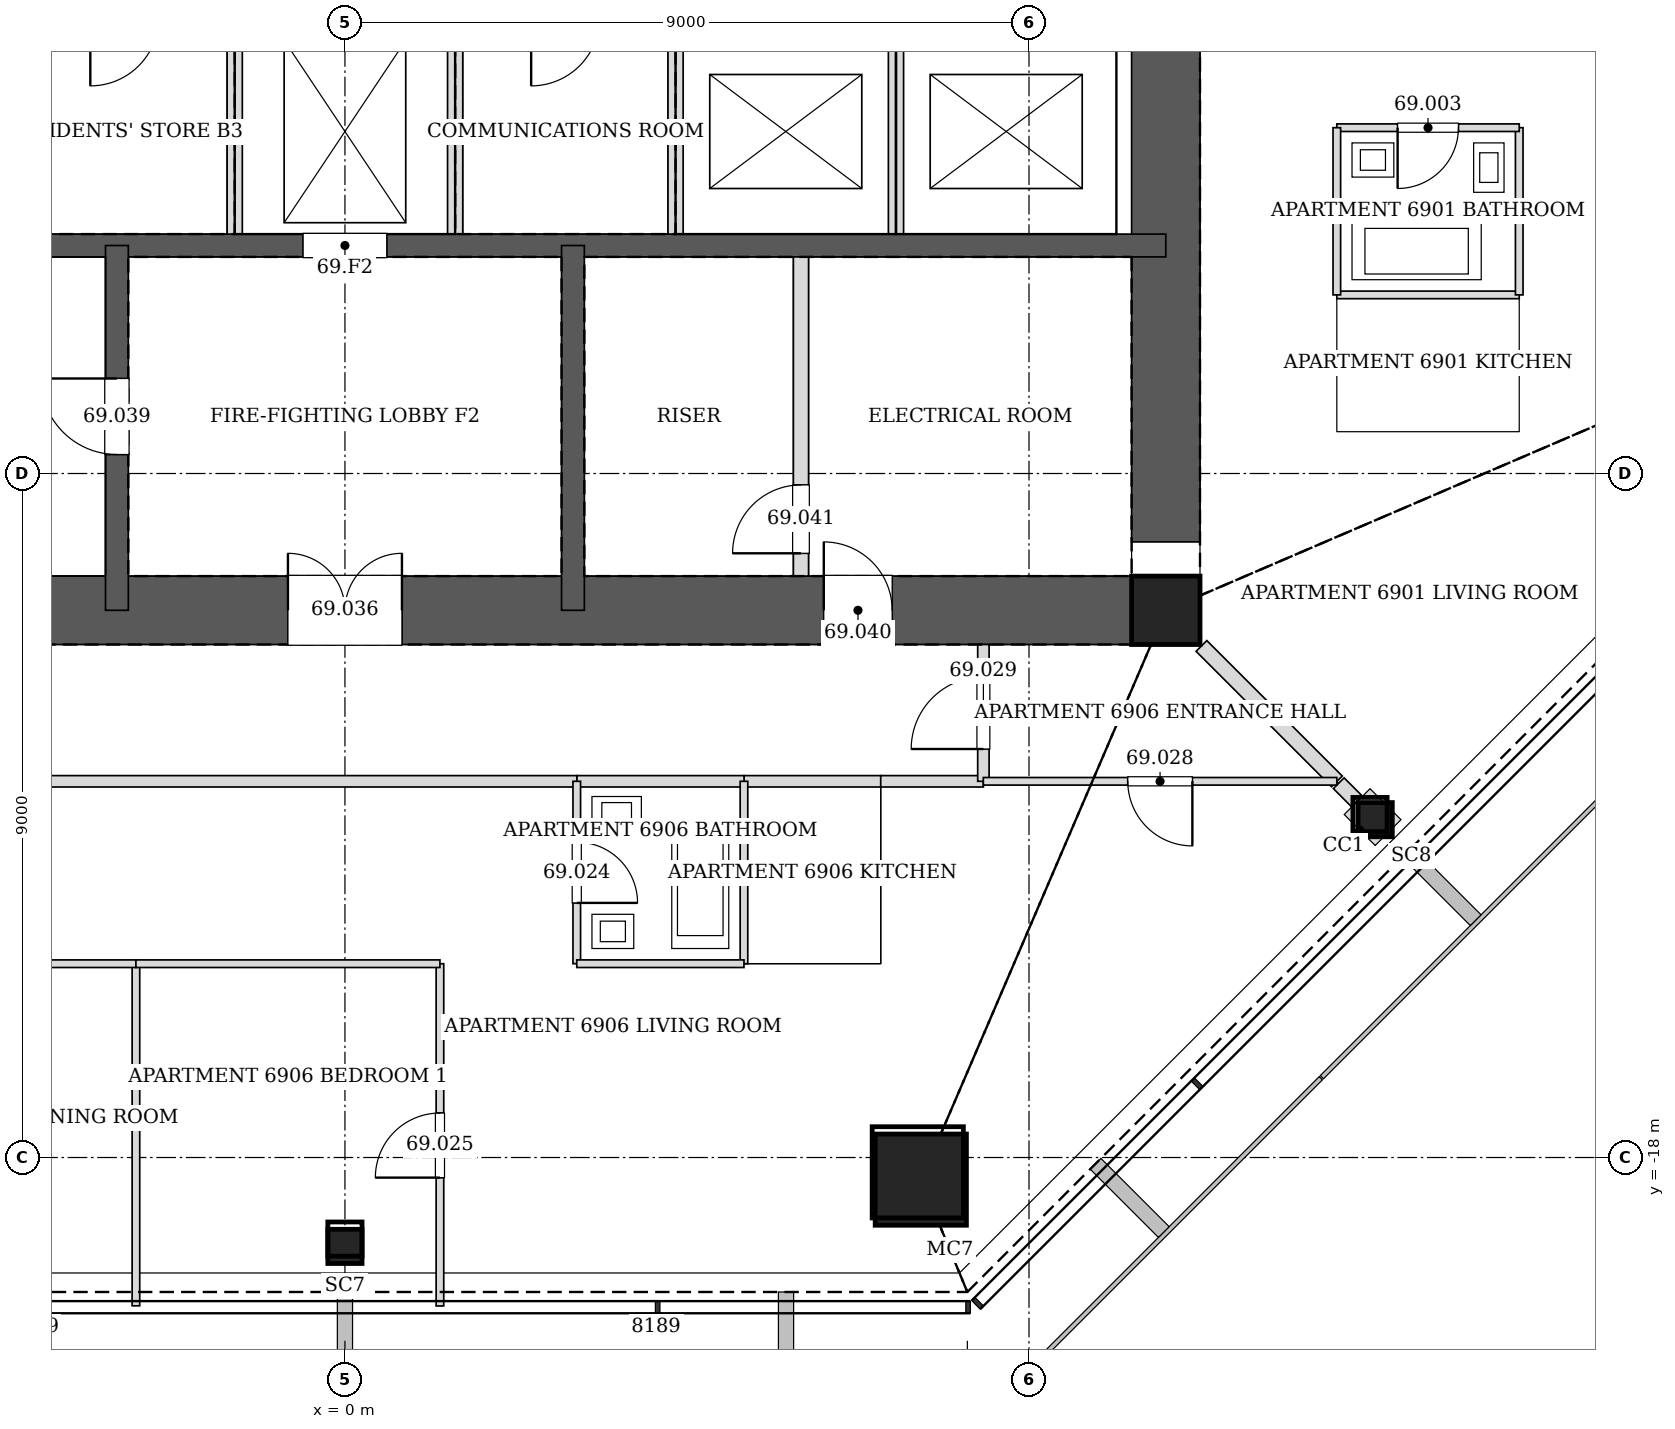
"""IFC4 building model, lengths in metres.
Left out: names, types, materials, properties, quantities, classifications, styles, units other than length and angle.
Written with IfcOpenShell. Run it as: python <this file> out.ifc"""

import sys

from ifc_helpers import new_model, si_unit, direction, frame, frame_2d, origin, origin_2d, place, context, subcontext, project, spatial, rectangle, hollow_rectangle, extrude, element, fill, save


model = new_model("IFC4")
c1 = context("Model", 3, precision=1e-05, world=origin(), true_north=direction((0.0, 1.0)))
c2 = subcontext(c1, "Body", "Model", "MODEL_VIEW")
j1 = project(units=[si_unit("LENGTHUNIT", "METRE"), si_unit("PLANEANGLEUNIT", "RADIAN")], contexts=[c1])
p1 = place(None, origin())
s1 = spatial("IfcSite", under=j1, at=p1, CompositionType="ELEMENT")
p2 = place(p1, origin())
s2 = spatial("IfcBuilding", under=s1, at=p2, CompositionType="ELEMENT")
p3 = place(p2, frame((0.0, 0.0, 284.4)))
s3 = spatial("IfcBuildingStorey", under=s2, at=p3, CompositionType="ELEMENT", Elevation=284.4)
p4 = place(p3, frame((7.576, -18.291, 0.0), z_axis=(-0.011698403216, 0.028277121884, 0.999531666202), x_axis=(-0.924045401938, -0.382282742426, 0.0)))
e1 = element("IfcColumn", 1, at=p4, inside=s3, PredefinedType="COLUMN", context=c2, shape_type="SweptSolid", body=[
    extrude(hollow_rectangle(XDim=1.2, YDim=1.2, WallThickness=0.055, at=origin_2d()), origin(), (0.0, 0.0, 1.0), 3.402),
])
for number, where, z_axis, x_axis in (
    (2, (0.0, -19.169, 0.0), (0.0, 0.028, 1.0), (-1.0, 0.0, 0.0)),
    (3, (13.555, -13.555, 0.0), (-0.02, 0.02, 1.0), (-0.707, -0.707, 0.0)),
):
    element("IfcColumn", number, at=place(p3, frame(where, z_axis=z_axis, x_axis=x_axis)), inside=s3, PredefinedType="COLUMN", context=c2, shape_type="SweptSolid", body=[
        extrude(hollow_rectangle(XDim=0.45, YDim=0.45, WallThickness=0.02, at=origin_2d()), origin(), (0.0, 0.0, 1.0), 3.402),
    ])
p5 = place(p3, frame((10.8, -10.8, 0.0), z_axis=(0.0, 0.0, 1.0), x_axis=(1.0, 0.0, 0.0)))
e4 = element("IfcColumn", 4, at=p5, inside=s3, PredefinedType="COLUMN", context=c2, shape_type="SweptSolid", body=[
    extrude(hollow_rectangle(XDim=0.9, YDim=0.9, WallThickness=0.04, at=origin_2d()), origin(), (0.0, 0.0, 1.0), 3.4),
])
p6 = place(p3, frame((-10.8, -10.8, 0.0), z_axis=(0.0, 0.0, 1.0), x_axis=(1.0, 0.0, 0.0)))
e5 = element("IfcWall", 5, at=p6, inside=s3, PredefinedType="SOLIDWALL", context=c2, shape_type="SweptSolid", body=[
    extrude(rectangle(XDim=21.6, YDim=0.9, at=frame_2d((10.8, 0.0))), origin(), (0.0, 0.0, 1.0), 3.4),
])
p7 = place(p6, frame((10.05, 0.0, 0.0)))
e6 = element("IfcOpeningElement", 6, at=p7, cuts=e5, PredefinedType="OPENING", context=c2, shape_type="SweptSolid", body=[
    extrude(rectangle(XDim=1.5, YDim=2.1, at=frame_2d((0.75, 1.05))), frame((0.0, 0.46, 0.0), z_axis=(0.0, -1.0, 0.0), x_axis=(1.0, 0.0, 0.0)), (0.0, 0.0, 1.0), 0.92),
])
p8 = place(p6, frame((17.1, 0.0, 0.0)))
e7 = element("IfcOpeningElement", 7, at=p8, cuts=e5, PredefinedType="OPENING", context=c2, shape_type="SweptSolid", body=[
    extrude(rectangle(XDim=0.9, YDim=2.1, at=frame_2d((0.45, 1.05))), frame((0.0, 0.46, 0.0), z_axis=(0.0, -1.0, 0.0), x_axis=(1.0, 0.0, 0.0)), (0.0, 0.0, 1.0), 0.92),
])
p9 = place(p3, frame((10.8, -10.8, 0.0), z_axis=(0.0, 0.0, 1.0), x_axis=(0.0, 1.0, 0.0)))
e8 = element("IfcWall", 8, at=p9, inside=s3, PredefinedType="SOLIDWALL", context=c2, shape_type="SweptSolid", body=[
    extrude(rectangle(XDim=21.6, YDim=0.9, at=frame_2d((10.8, 0.0))), origin(), (0.0, 0.0, 1.0), 3.4),
])
p10 = place(p9, frame((11.7, 0.0, 0.0)))
e9 = element("IfcOpeningElement", 9, at=p10, cuts=e8, PredefinedType="OPENING", context=c2, shape_type="SweptSolid", body=[
    extrude(rectangle(XDim=1.2, YDim=2.1, at=frame_2d((0.6, 1.05))), frame((0.0, 0.46, 0.0), z_axis=(0.0, -1.0, 0.0), x_axis=(1.0, 0.0, 0.0)), (0.0, 0.0, 1.0), 0.92),
])
p11 = place(p9, frame((8.7, 0.0, 0.0)))
e10 = element("IfcOpeningElement", 10, at=p11, cuts=e8, PredefinedType="OPENING", context=c2, shape_type="SweptSolid", body=[
    extrude(rectangle(XDim=1.2, YDim=2.1, at=frame_2d((0.6, 1.05))), frame((0.0, 0.46, 0.0), z_axis=(0.0, -1.0, 0.0), x_axis=(1.0, 0.0, 0.0)), (0.0, 0.0, 1.0), 0.92),
])
p12 = place(p3, frame((-10.8, -6.0, 0.0), z_axis=(0.0, 0.0, 1.0), x_axis=(1.0, 0.0, 0.0)))
e11 = element("IfcWall", 11, at=p12, inside=s3, PredefinedType="SOLIDWALL", context=c2, shape_type="SweptSolid", body=[
    extrude(rectangle(XDim=21.6, YDim=0.3, at=frame_2d((10.8, 0.0))), origin(), (0.0, 0.0, 1.0), 3.4),
])
p13 = place(p12, frame((10.25, 0.0, 0.0)))
e12 = element("IfcOpeningElement", 12, at=p13, cuts=e11, PredefinedType="OPENING", context=c2, shape_type="SweptSolid", body=[
    extrude(rectangle(XDim=1.1, YDim=2.1, at=frame_2d((0.55, 1.05))), frame((0.0, 0.16, 0.0), z_axis=(0.0, -1.0, 0.0), x_axis=(1.0, 0.0, 0.0)), (0.0, 0.0, 1.0), 0.32),
])
p14 = place(p3, frame((-3.0, -6.0, 0.0), z_axis=(0.0, 0.0, 1.0), x_axis=(0.0, -1.0, 0.0)))
e13 = element("IfcWall", 13, at=p14, inside=s3, PredefinedType="SOLIDWALL", context=c2, shape_type="SweptSolid", body=[
    extrude(rectangle(XDim=4.8, YDim=0.3, at=frame_2d((2.4, 0.0))), origin(), (0.0, 0.0, 1.0), 3.4),
])
p15 = place(p14, frame((1.75, 0.0, 0.0)))
e14 = element("IfcOpeningElement", 14, at=p15, cuts=e13, PredefinedType="OPENING", context=c2, shape_type="SweptSolid", body=[
    extrude(rectangle(XDim=1.0, YDim=2.1, at=frame_2d((0.5, 1.05))), frame((0.0, 0.16, 0.0), z_axis=(0.0, -1.0, 0.0), x_axis=(1.0, 0.0, 0.0)), (0.0, 0.0, 1.0), 0.32),
])
p16 = place(p3, frame((3.0, -6.0, 0.0), z_axis=(0.0, 0.0, 1.0), x_axis=(0.0, -1.0, 0.0)))
e15 = element("IfcWall", 15, at=p16, inside=s3, PredefinedType="SOLIDWALL", context=c2, shape_type="SweptSolid", body=[
    extrude(rectangle(XDim=4.8, YDim=0.3, at=frame_2d((2.4, 0.0))), origin(), (0.0, 0.0, 1.0), 3.4),
])
p17 = place(p3, frame((5.249, -13.05, 0.0), z_axis=(0.0, 0.0, 1.0), x_axis=(1.0, 0.0, 0.0)))
e16 = element("IfcWall", 16, at=p17, inside=s3, PredefinedType="PARTITIONING", context=c2, shape_type="SweptSolid", body=[
    extrude(rectangle(XDim=1.802, YDim=0.15, at=frame_2d((0.901, 0.0))), origin(), (0.0, 0.0, 1.0), 3.2),
])
p18 = place(p3, frame((3.049, -13.05, 0.0), z_axis=(0.0, 0.0, 1.0), x_axis=(1.0, 0.0, 0.0)))
e17 = element("IfcWall", 17, at=p18, inside=s3, PredefinedType="PARTITIONING", context=c2, shape_type="SweptSolid", body=[
    extrude(rectangle(XDim=2.202, YDim=0.15, at=frame_2d((1.101, 0.0))), origin(), (0.0, 0.0, 1.0), 3.2),
])
p19 = place(p3, frame((-6.751, -13.05, 0.0), z_axis=(0.0, 0.0, 1.0), x_axis=(1.0, 0.0, 0.0)))
e18 = element("IfcWall", 18, at=p19, inside=s3, PredefinedType="PARTITIONING", context=c2, shape_type="SweptSolid", body=[
    extrude(rectangle(XDim=9.802, YDim=0.15, at=frame_2d((4.901, 0.0))), origin(), (0.0, 0.0, 1.0), 2.349),
])
p20 = place(p3, frame((7.049, -13.05, 0.0), z_axis=(0.0, 0.0, 1.0), x_axis=(1.0, 0.0, 0.0)))
e19 = element("IfcWall", 19, at=p20, inside=s3, PredefinedType="PARTITIONING", context=c2, shape_type="SweptSolid", body=[
    extrude(rectangle(XDim=1.351, YDim=0.15, at=frame_2d((0.675, 0.0))), origin(), (0.0, 0.0, 1.0), 3.2),
])
p21 = place(p3, frame((8.4, -13.05, 0.0), z_axis=(0.0, 0.0, 1.0), x_axis=(0.0, 1.0, 0.0)))
e20 = element("IfcWall", 20, at=p21, inside=s3, PredefinedType="PARTITIONING", context=c2, shape_type="SweptSolid", body=[
    extrude(rectangle(XDim=1.8, YDim=0.15, at=frame_2d((0.9, 0.0))), origin(), (0.0, 0.0, 1.0), 3.2),
])
p22 = place(p21, frame((0.425, 0.0, 0.0)))
e21 = element("IfcOpeningElement", 21, at=p22, cuts=e20, PredefinedType="OPENING", context=c2, shape_type="SweptSolid", body=[
    extrude(rectangle(XDim=0.95, YDim=2.1, at=frame_2d((0.475, 1.05))), frame((0.0, 0.085, 0.0), z_axis=(0.0, -1.0, 0.0), x_axis=(1.0, 0.0, 0.0)), (0.0, 0.0, 1.0), 0.17),
])
p23 = place(p3, frame((-2.75, -19.951, 0.0), z_axis=(0.0, 0.0, 1.0), x_axis=(0.0, 1.0, 0.0)))
e22 = element("IfcWall", 22, at=p23, inside=s3, PredefinedType="PARTITIONING", context=c2, shape_type="SweptSolid", body=[
    extrude(rectangle(XDim=4.501, YDim=0.1, at=frame_2d((2.251, 0.0))), origin(), (0.0, 0.0, 1.0), 2.591),
])
p24 = place(p3, frame((-2.75, -15.45, 0.0), z_axis=(0.0, 0.0, 1.0), x_axis=(-1.0, 0.0, 0.0)))
e23 = element("IfcWall", 23, at=p24, inside=s3, PredefinedType="PARTITIONING", context=c2, shape_type="SweptSolid", body=[
    extrude(rectangle(XDim=3.4, YDim=0.1, at=frame_2d((1.7, 0.0))), origin(), (0.0, 0.0, 1.0), 3.2),
])
p25 = place(p3, frame((15.45, -6.65, 0.0), z_axis=(0.0, 0.0, 1.0), x_axis=(-1.0, 0.0, 0.0)))
e24 = element("IfcWall", 24, at=p25, inside=s3, PredefinedType="PARTITIONING", context=c2, shape_type="SweptSolid", body=[
    extrude(rectangle(XDim=2.4, YDim=0.1, at=frame_2d((1.2, 0.0))), origin(), (0.0, 0.0, 1.0), 2.591),
])
p26 = place(p3, frame((15.45, -6.65, 0.0), z_axis=(0.0, 0.0, 1.0), x_axis=(0.0, 1.0, 0.0)))
e25 = element("IfcWall", 25, at=p26, inside=s3, PredefinedType="PARTITIONING", context=c2, shape_type="SweptSolid", body=[
    extrude(rectangle(XDim=2.2, YDim=0.1, at=frame_2d((1.1, 0.0))), origin(), (0.0, 0.0, 1.0), 3.2),
])
p27 = place(p3, frame((15.45, -4.45, 0.0), z_axis=(0.0, 0.0, 1.0), x_axis=(-1.0, 0.0, 0.0)))
e26 = element("IfcWall", 26, at=p27, inside=s3, PredefinedType="PARTITIONING", context=c2, shape_type="SweptSolid", body=[
    extrude(rectangle(XDim=2.4, YDim=0.1, at=frame_2d((1.2, 0.0))), origin(), (0.0, 0.0, 1.0), 2.591),
])
p28 = place(p27, frame((0.8, 0.0, 0.0)))
e27 = element("IfcOpeningElement", 27, at=p28, cuts=e26, PredefinedType="OPENING", context=c2, shape_type="SweptSolid", body=[
    extrude(rectangle(XDim=0.8, YDim=2.1, at=frame_2d((0.4, 1.05))), frame((0.0, 0.06, 0.0), z_axis=(0.0, -1.0, 0.0), x_axis=(1.0, 0.0, 0.0)), (0.0, 0.0, 1.0), 0.12),
])
p29 = place(p3, frame((13.05, -4.45, 0.0), z_axis=(0.0, 0.0, 1.0), x_axis=(0.0, -1.0, 0.0)))
e28 = element("IfcWall", 28, at=p29, inside=s3, PredefinedType="PARTITIONING", context=c2, shape_type="SweptSolid", body=[
    extrude(rectangle(XDim=2.2, YDim=0.1, at=frame_2d((1.1, 0.0))), origin(), (0.0, 0.0, 1.0), 3.2),
])
p30 = place(p3, frame((13.075, -13.075, 0.0), z_axis=(0.0, 0.0, 1.0), x_axis=(0.707106781187, -0.707106781187, 0.0)))
e29 = element("IfcWall", 29, at=p30, inside=s3, PredefinedType="PARTITIONING", context=c2, shape_type="SweptSolid", body=[
    extrude(rectangle(XDim=0.338, YDim=0.2, at=frame_2d((0.169, 0.0))), origin(), (0.0, 0.0, 1.0), 2.591),
])
p31 = place(p3, frame((11.269, -11.269, 0.0), z_axis=(0.0, 0.0, 1.0), x_axis=(0.707106781187, -0.707106781187, 0.0)))
e30 = element("IfcWall", 30, at=p31, inside=s3, PredefinedType="PARTITIONING", context=c2, shape_type="SweptSolid", body=[
    extrude(rectangle(XDim=2.52, YDim=0.2, at=frame_2d((1.26, 0.0))), origin(), (0.0, 0.0, 1.0), 2.591),
])
p32 = place(p3, frame((5.25, -13.05, 0.0), z_axis=(0.0, 0.0, 1.0), x_axis=(0.0, -1.0, 0.0)))
e31 = element("IfcWall", 31, at=p32, inside=s3, PredefinedType="PARTITIONING", context=c2, shape_type="SweptSolid", body=[
    extrude(rectangle(XDim=2.4, YDim=0.1, at=frame_2d((1.2, 0.0))), origin(), (0.0, 0.0, 1.0), 2.591),
])
p33 = place(p3, frame((3.05, -13.05, 0.0), z_axis=(0.0, 0.0, 1.0), x_axis=(0.0, -1.0, 0.0)))
e32 = element("IfcWall", 32, at=p33, inside=s3, PredefinedType="PARTITIONING", context=c2, shape_type="SweptSolid", body=[
    extrude(rectangle(XDim=2.4, YDim=0.1, at=frame_2d((1.2, 0.0))), origin(), (0.0, 0.0, 1.0), 2.591),
])
p34 = place(p33, frame((0.8, 0.0, 0.0)))
e33 = element("IfcOpeningElement", 33, at=p34, cuts=e32, PredefinedType="OPENING", context=c2, shape_type="SweptSolid", body=[
    extrude(rectangle(XDim=0.8, YDim=2.1, at=frame_2d((0.4, 1.05))), frame((0.0, 0.06, 0.0), z_axis=(0.0, -1.0, 0.0), x_axis=(1.0, 0.0, 0.0)), (0.0, 0.0, 1.0), 0.12),
])
p35 = place(p3, frame((3.05, -15.45, 0.0), z_axis=(0.0, 0.0, 1.0), x_axis=(1.0, 0.0, 0.0)))
e34 = element("IfcWall", 34, at=p35, inside=s3, PredefinedType="PARTITIONING", context=c2, shape_type="SweptSolid", body=[
    extrude(rectangle(XDim=2.2, YDim=0.1, at=frame_2d((1.1, 0.0))), origin(), (0.0, 0.0, 1.0), 3.2),
])
p36 = place(p3, frame((1.25, -19.953, 0.0), z_axis=(0.0, 0.0, 1.0), x_axis=(0.0, 1.0, 0.0)))
e35 = element("IfcWall", 35, at=p36, inside=s3, PredefinedType="PARTITIONING", context=c2, shape_type="SweptSolid", body=[
    extrude(rectangle(XDim=4.503, YDim=0.1, at=frame_2d((2.252, 0.0))), origin(), (0.0, 0.0, 1.0), 2.591),
])
p37 = place(p36, frame((1.689, 0.0, 0.0)))
e36 = element("IfcOpeningElement", 36, at=p37, cuts=e35, PredefinedType="OPENING", context=c2, shape_type="SweptSolid", body=[
    extrude(rectangle(XDim=0.85, YDim=2.1, at=frame_2d((0.425, 1.05))), frame((0.0, 0.06, 0.0), z_axis=(0.0, -1.0, 0.0), x_axis=(1.0, 0.0, 0.0)), (0.0, 0.0, 1.0), 0.12),
])
p38 = place(p3, frame((1.25, -15.45, 0.0), z_axis=(0.0, 0.0, 1.0), x_axis=(-1.0, 0.0, 0.0)))
e37 = element("IfcWall", 37, at=p38, inside=s3, PredefinedType="PARTITIONING", context=c2, shape_type="SweptSolid", body=[
    extrude(rectangle(XDim=4.0, YDim=0.1, at=frame_2d((2.0, 0.0))), origin(), (0.0, 0.0, 1.0), 2.349),
])
p39 = place(p3, frame((13.05, -13.05, 0.0), z_axis=(0.0, 0.0, 1.0), x_axis=(-1.0, 0.0, 0.0)))
e38 = element("IfcWall", 38, at=p39, inside=s3, PredefinedType="PARTITIONING", context=c2, shape_type="SweptSolid", body=[
    extrude(rectangle(XDim=4.651, YDim=0.1, at=frame_2d((2.326, 0.0))), origin(), (0.0, 0.0, 1.0), 2.497),
])
p40 = place(p39, frame((1.9, 0.0, 0.0)))
e39 = element("IfcOpeningElement", 39, at=p40, cuts=e38, PredefinedType="OPENING", context=c2, shape_type="SweptSolid", body=[
    extrude(rectangle(XDim=0.85, YDim=2.1, at=frame_2d((0.425, 1.05))), frame((0.0, 0.06, 0.0), z_axis=(0.0, -1.0, 0.0), x_axis=(1.0, 0.0, 0.0)), (0.0, 0.0, 1.0), 0.12),
])
for number, where, z_axis, x_axis in (
    (40, (-1.45, -5.85, 0.0), (0.0, 0.0, 1.0), (0.0, 1.0, 0.0)),
    (41, (1.45, -5.85, 0.0), (0.0, 0.0, 1.0), (0.0, 1.0, 0.0)),
    (42, (4.35, -5.85, 0.0), (0.0, 0.0, 1.0), (0.0, 1.0, 0.0)),
):
    element("IfcWall", number, at=place(p3, frame(where, z_axis=z_axis, x_axis=x_axis)), inside=s3, PredefinedType="PARTITIONING", context=c2, shape_type="SweptSolid", body=[
        extrude(rectangle(XDim=2.7, YDim=0.2, at=frame_2d((1.35, 0.0))), origin(), (0.0, 0.0, 1.0), 3.2),
    ])
p41 = place(p3, frame((7.25, -5.85, 0.0), z_axis=(0.0, 0.0, 1.0), x_axis=(0.0, 1.0, 0.0)))
e43 = element("IfcWall", 43, at=p41, inside=s3, PredefinedType="PARTITIONING", context=c2, shape_type="SweptSolid", body=[
    extrude(rectangle(XDim=2.7, YDim=0.2, at=frame_2d((1.35, 0.0))), origin(), (0.0, 0.0, 1.0), 3.4),
])
p42 = place(p3, frame((6.0, -10.35, 0.0), z_axis=(0.0, 0.0, 1.0), x_axis=(0.0, 1.0, 0.0)))
e44 = element("IfcWall", 44, at=p42, inside=s3, PredefinedType="PARTITIONING", context=c2, shape_type="SweptSolid", body=[
    extrude(rectangle(XDim=4.2, YDim=0.2, at=frame_2d((2.1, 0.0))), origin(), (0.0, 0.0, 1.0), 3.2),
])
p43 = place(p42, frame((0.3, 0.0, 0.0)))
e45 = element("IfcOpeningElement", 45, at=p43, cuts=e44, PredefinedType="OPENING", context=c2, shape_type="SweptSolid", body=[
    extrude(rectangle(XDim=0.9, YDim=2.1, at=frame_2d((0.45, 1.05))), frame((0.0, 0.11, 0.0), z_axis=(0.0, -1.0, 0.0), x_axis=(1.0, 0.0, 0.0)), (0.0, 0.0, 1.0), 0.22),
])
p44 = place(p28, origin())
e46 = element("IfcDoor", 46, at=p44, inside=s3, OperationType="SINGLE_SWING_RIGHT", PredefinedType="DOOR", context=c2, shape_type="SweptSolid", body=[
    extrude(rectangle(XDim=0.8, YDim=2.1, at=frame_2d((0.4, 1.05))), frame((0.0, 0.025, 0.0), z_axis=(0.0, -1.0, 0.0), x_axis=(1.0, 0.0, 0.0)), (0.0, 0.0, 1.0), 0.05),
])
fill(e27, e46)
p45 = place(p34, origin())
e47 = element("IfcDoor", 47, at=p45, inside=s3, OperationType="SINGLE_SWING_RIGHT", PredefinedType="DOOR", context=c2, shape_type="SweptSolid", body=[
    extrude(rectangle(XDim=0.8, YDim=2.1, at=frame_2d((0.4, 1.05))), frame((0.0, 0.025, 0.0), z_axis=(0.0, -1.0, 0.0), x_axis=(1.0, 0.0, 0.0)), (0.0, 0.0, 1.0), 0.05),
])
fill(e33, e47)
p46 = place(p37, origin())
e48 = element("IfcDoor", 48, at=p46, inside=s3, OperationType="SINGLE_SWING_LEFT", PredefinedType="DOOR", context=c2, shape_type="SweptSolid", body=[
    extrude(rectangle(XDim=0.85, YDim=2.1, at=frame_2d((0.425, 1.05))), frame((0.0, 0.025, 0.0), z_axis=(0.0, -1.0, 0.0), x_axis=(1.0, 0.0, 0.0)), (0.0, 0.0, 1.0), 0.05),
])
fill(e36, e48)
p47 = place(p40, origin())
e49 = element("IfcDoor", 49, at=p47, inside=s3, OperationType="SINGLE_SWING_LEFT", PredefinedType="DOOR", context=c2, shape_type="SweptSolid", body=[
    extrude(rectangle(XDim=0.85, YDim=2.1, at=frame_2d((0.425, 1.05))), frame((0.0, 0.025, 0.0), z_axis=(0.0, -1.0, 0.0), x_axis=(1.0, 0.0, 0.0)), (0.0, 0.0, 1.0), 0.05),
])
fill(e39, e49)
p48 = place(p22, origin())
e50 = element("IfcDoor", 50, at=p48, inside=s3, OperationType="SINGLE_SWING_LEFT", PredefinedType="DOOR", context=c2, shape_type="SweptSolid", body=[
    extrude(rectangle(XDim=0.95, YDim=2.1, at=frame_2d((0.475, 1.05))), frame((0.0, 0.025, 0.0), z_axis=(0.0, -1.0, 0.0), x_axis=(1.0, 0.0, 0.0)), (0.0, 0.0, 1.0), 0.05),
])
fill(e21, e50)
p49 = place(p7, origin())
e51 = element("IfcDoor", 51, at=p49, inside=s3, OperationType="DOUBLE_DOOR_SINGLE_SWING", PredefinedType="DOOR", context=c2, shape_type="SweptSolid", body=[
    extrude(rectangle(XDim=1.5, YDim=2.1, at=frame_2d((0.75, 1.05))), frame((0.0, 0.025, 0.0), z_axis=(0.0, -1.0, 0.0), x_axis=(1.0, 0.0, 0.0)), (0.0, 0.0, 1.0), 0.05),
])
fill(e6, e51)
p50 = place(p15, frame((1.0, 0.0, 0.0), z_axis=(0.0, 0.0, 1.0), x_axis=(-1.0, 0.0, 0.0)))
e52 = element("IfcDoor", 52, at=p50, inside=s3, OperationType="SINGLE_SWING_RIGHT", PredefinedType="DOOR", context=c2, shape_type="SweptSolid", body=[
    extrude(rectangle(XDim=1.0, YDim=2.1, at=frame_2d((0.5, 1.05))), frame((0.0, 0.025, 0.0), z_axis=(0.0, -1.0, 0.0), x_axis=(1.0, 0.0, 0.0)), (0.0, 0.0, 1.0), 0.05),
])
fill(e14, e52)
p51 = place(p8, origin())
e53 = element("IfcDoor", 53, at=p51, inside=s3, OperationType="SINGLE_SWING_LEFT", PredefinedType="DOOR", context=c2, shape_type="SweptSolid", body=[
    extrude(rectangle(XDim=0.9, YDim=2.1, at=frame_2d((0.45, 1.05))), frame((0.0, 0.025, 0.0), z_axis=(0.0, -1.0, 0.0), x_axis=(1.0, 0.0, 0.0)), (0.0, 0.0, 1.0), 0.05),
])
fill(e7, e53)
p52 = place(p43, origin())
e54 = element("IfcDoor", 54, at=p52, inside=s3, OperationType="SINGLE_SWING_LEFT", PredefinedType="DOOR", context=c2, shape_type="SweptSolid", body=[
    extrude(rectangle(XDim=0.9, YDim=2.1, at=frame_2d((0.45, 1.05))), frame((0.0, 0.025, 0.0), z_axis=(0.0, -1.0, 0.0), x_axis=(1.0, 0.0, 0.0)), (0.0, 0.0, 1.0), 0.05),
])
fill(e45, e54)
p53 = place(p13, origin())
e55 = element("IfcDoor", 55, at=p53, inside=s3, OperationType="DOUBLE_DOOR_SLIDING", PredefinedType="DOOR", context=c2, shape_type="SweptSolid", body=[
    extrude(rectangle(XDim=1.1, YDim=2.1, at=frame_2d((0.55, 1.05))), frame((0.0, 0.025, 0.0), z_axis=(0.0, -1.0, 0.0), x_axis=(1.0, 0.0, 0.0)), (0.0, 0.0, 1.0), 0.05),
])
fill(e12, e55)
save(model, sys.argv[1])
